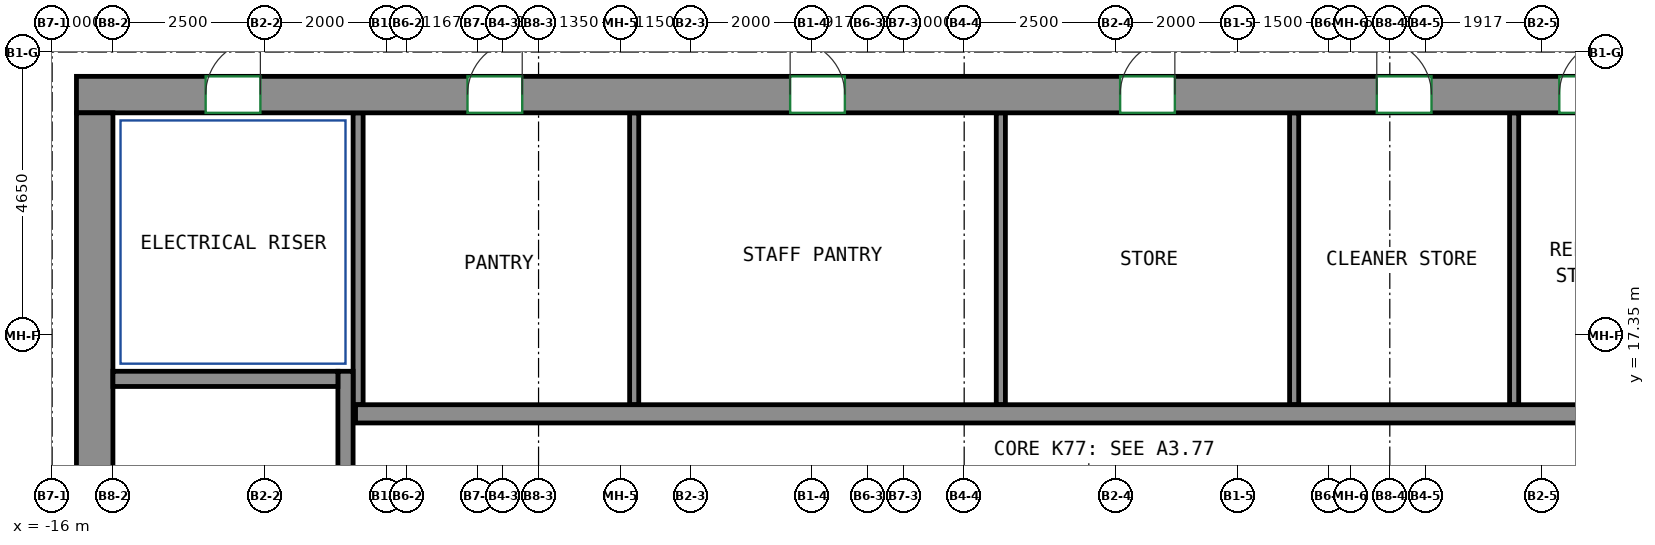
"""IFC4 building model, lengths in metres.
Left out: names, types, materials, properties, quantities, classifications, styles, units other than length and angle.
Written with IfcOpenShell. Run it as: python <this file> out.ifc"""

import sys

from ifc_helpers import new_model, si_unit, direction, frame, frame_2d, origin, place, context, subcontext, project, spatial, rectangle, extrude, source, transform, mapped, element, fill, save


model = new_model("IFC4")
c1 = context("Model", 3, precision=1e-05, world=origin(), true_north=direction((0.0, 1.0)))
c2 = subcontext(c1, "Body", "Model", "MODEL_VIEW")
j1 = project(units=[si_unit("LENGTHUNIT", "METRE"), si_unit("PLANEANGLEUNIT", "RADIAN")], contexts=[c1])
p1 = place(None, origin())
s1 = spatial("IfcSite", under=j1, at=p1, CompositionType="ELEMENT")
p2 = place(p1, origin())
s2 = spatial("IfcBuilding", under=s1, at=p2, CompositionType="ELEMENT")
p3 = place(p2, frame((0.0, 0.0, 305.2)))
s3 = spatial("IfcBuildingStorey", under=s2, at=p3, CompositionType="ELEMENT", Elevation=305.2)
m1 = source(origin(), c2, "Body", "SweptSolid", [
    extrude(rectangle(XDim=33.3, YDim=0.6, at=frame_2d((16.65, 0.0))), origin(), (0.0, 0.0, 1.0), 3.12),
])
p4 = place(p3, frame((-15.6, 21.3, 0.0), z_axis=(0.0, 0.0, 1.0), x_axis=(1.0, 0.0, 0.0)))
e1 = element("IfcWall", 1, at=p4, inside=s3, PredefinedType="SHEAR", context=c2, shape_type="MappedRepresentation", body=[
    mapped(m1, transform((0.0, 0.0, 0.0))),
])
p5 = place(p4, frame((6.431, 0.0, 0.0)))
e2 = element("IfcOpeningElement", 2, at=p5, cuts=e1, PredefinedType="OPENING", context=c2, shape_type="SweptSolid", body=[
    extrude(rectangle(XDim=0.9, YDim=2.1, at=frame_2d((0.45, 1.05))), frame((0.0, 0.31, 0.0), z_axis=(0.0, -1.0, 0.0), x_axis=(1.0, 0.0, 0.0)), (0.0, 0.0, 1.0), 0.62),
])
p6 = place(p4, frame((11.738, 0.0, 0.0)))
e3 = element("IfcOpeningElement", 3, at=p6, cuts=e1, PredefinedType="OPENING", context=c2, shape_type="SweptSolid", body=[
    extrude(rectangle(XDim=0.9, YDim=2.1, at=frame_2d((0.45, 1.05))), frame((0.0, 0.31, 0.0), z_axis=(0.0, -1.0, 0.0), x_axis=(1.0, 0.0, 0.0)), (0.0, 0.0, 1.0), 0.62),
])
p7 = place(p4, frame((17.165, 0.0, 0.0)))
e4 = element("IfcOpeningElement", 4, at=p7, cuts=e1, PredefinedType="OPENING", context=c2, shape_type="SweptSolid", body=[
    extrude(rectangle(XDim=0.9, YDim=2.1, at=frame_2d((0.45, 1.05))), frame((0.0, 0.31, 0.0), z_axis=(0.0, -1.0, 0.0), x_axis=(1.0, 0.0, 0.0)), (0.0, 0.0, 1.0), 0.62),
])
p8 = place(p4, frame((21.386, 0.0, 0.0)))
e5 = element("IfcOpeningElement", 5, at=p8, cuts=e1, PredefinedType="OPENING", context=c2, shape_type="SweptSolid", body=[
    extrude(rectangle(XDim=0.9, YDim=2.1, at=frame_2d((0.45, 1.05))), frame((0.0, 0.31, 0.0), z_axis=(0.0, -1.0, 0.0), x_axis=(1.0, 0.0, 0.0)), (0.0, 0.0, 1.0), 0.62),
])
p9 = place(p4, frame((24.387, 0.0, 0.0)))
e6 = element("IfcOpeningElement", 6, at=p9, cuts=e1, PredefinedType="OPENING", context=c2, shape_type="SweptSolid", body=[
    extrude(rectangle(XDim=0.9, YDim=2.1, at=frame_2d((0.45, 1.05))), frame((0.0, 0.31, 0.0), z_axis=(0.0, -1.0, 0.0), x_axis=(1.0, 0.0, 0.0)), (0.0, 0.0, 1.0), 0.62),
])
p10 = place(p4, frame((26.92, 0.0, 0.0)))
e7 = element("IfcOpeningElement", 7, at=p10, cuts=e1, PredefinedType="OPENING", context=c2, shape_type="SweptSolid", body=[
    extrude(rectangle(XDim=0.9, YDim=2.1, at=frame_2d((0.45, 1.05))), frame((0.0, 0.31, 0.0), z_axis=(0.0, -1.0, 0.0), x_axis=(1.0, 0.0, 0.0)), (0.0, 0.0, 1.0), 0.62),
])
p11 = place(p4, frame((2.125, 0.0, 0.0)))
e8 = element("IfcOpeningElement", 8, at=p11, cuts=e1, PredefinedType="OPENING", context=c2, shape_type="SweptSolid", body=[
    extrude(rectangle(XDim=0.9, YDim=2.1, at=frame_2d((0.45, 1.05))), frame((0.0, 0.31, 0.0), z_axis=(0.0, -1.0, 0.0), x_axis=(1.0, 0.0, 0.0)), (0.0, 0.0, 1.0), 0.62),
])
p12 = place(p4, frame((30.275, 0.0, 0.0)))
e9 = element("IfcOpeningElement", 9, at=p12, cuts=e1, PredefinedType="OPENING", context=c2, shape_type="SweptSolid", body=[
    extrude(rectangle(XDim=0.9, YDim=2.1, at=frame_2d((0.45, 1.05))), frame((0.0, 0.31, 0.0), z_axis=(0.0, -1.0, 0.0), x_axis=(1.0, 0.0, 0.0)), (0.0, 0.0, 1.0), 0.62),
])
m2 = source(origin(), c2, "Body", "SweptSolid", [
    extrude(rectangle(XDim=12.0, YDim=0.6, at=frame_2d((6.0, 0.0))), origin(), (0.0, 0.0, 1.0), 3.12),
])
p13 = place(p3, frame((-15.3, 9.0, 0.0), z_axis=(0.0, 0.0, 1.0), x_axis=(0.0, 1.0, 0.0)))
e10 = element("IfcWall", 10, at=p13, inside=s3, PredefinedType="SHEAR", context=c2, shape_type="MappedRepresentation", body=[
    mapped(m2, transform((0.0, 0.0, 0.0))),
])
m3 = source(origin(), c2, "Body", "SweptSolid", [
    extrude(rectangle(XDim=7.75, YDim=0.25, at=frame_2d((3.875, 0.0))), origin(), (0.0, 0.0, 1.0), 3.12),
])
p14 = place(p3, frame((-11.175, 9.0, 0.0), z_axis=(0.0, 0.0, 1.0), x_axis=(0.0, 1.0, 0.0)))
e11 = element("IfcWall", 11, at=p14, inside=s3, PredefinedType="SHEAR", context=c2, shape_type="MappedRepresentation", body=[
    mapped(m3, transform((0.0, 0.0, 0.0))),
])
m4 = source(origin(), c2, "Body", "SweptSolid", [
    extrude(rectangle(XDim=3.7, YDim=0.25, at=frame_2d((1.85, 0.0))), origin(), (0.0, 0.0, 1.0), 3.12),
])
p15 = place(p3, frame((-15.0, 16.625, 0.0), z_axis=(0.0, 0.0, 1.0), x_axis=(1.0, 0.0, 0.0)))
e12 = element("IfcWall", 12, at=p15, inside=s3, PredefinedType="SHEAR", context=c2, shape_type="MappedRepresentation", body=[
    mapped(m4, transform((0.0, 0.0, 0.0))),
])
m5 = source(origin(), c2, "Body", "SweptSolid", [
    extrude(rectangle(XDim=22.08, YDim=0.3, at=frame_2d((11.04, 0.0))), origin(), (0.0, 0.0, 1.0), 3.12),
])
p16 = place(p3, frame((-11.01, 16.05, 0.0), z_axis=(0.0, 0.0, 1.0), x_axis=(1.0, 0.0, 0.0)))
e13 = element("IfcWall", 13, at=p16, inside=s3, PredefinedType="SHEAR", context=c2, shape_type="MappedRepresentation", body=[
    mapped(m5, transform((0.0, 0.0, 0.0))),
])
m6 = source(origin(), c2, "Body", "SweptSolid", [
    extrude(rectangle(XDim=4.8, YDim=0.165, at=frame_2d((2.4, 0.0))), origin(), (0.0, 0.0, 1.0), 3.12),
])
p17 = place(p3, frame((-10.968, 16.2, 0.0), z_axis=(0.0, 0.0, 1.0), x_axis=(0.0, 1.0, 0.0)))
e14 = element("IfcWall", 14, at=p17, inside=s3, PredefinedType="PARTITIONING", context=c2, shape_type="MappedRepresentation", body=[
    mapped(m6, transform((0.0, 0.0, 0.0))),
])
m7 = source(origin(), c2, "Body", "SweptSolid", [
    extrude(rectangle(XDim=4.8, YDim=0.15, at=frame_2d((2.4, 0.0))), origin(), (0.0, 0.0, 1.0), 3.12),
])
for number, where, z_axis, x_axis in (
    (15, (-6.427, 16.2, 0.0), (0.0, 0.0, 1.0), (0.0, 1.0, 0.0)),
    (16, (-0.397, 16.2, 0.0), (0.0, 0.0, 1.0), (0.0, 1.0, 0.0)),
    (17, (4.427, 16.2, 0.0), (0.0, 0.0, 1.0), (0.0, 1.0, 0.0)),
    (18, (8.045, 16.2, 0.0), (0.0, 0.0, 1.0), (0.0, 1.0, 0.0)),
):
    element("IfcWall", number, at=place(p3, frame(where, z_axis=z_axis, x_axis=x_axis)), inside=s3, PredefinedType="PARTITIONING", context=c2, shape_type="MappedRepresentation", body=[
        mapped(m7, transform((0.0, 0.0, 0.0))),
    ])
p18 = place(p5, origin())
e19 = element("IfcDoor", 19, at=p18, inside=s3, OperationType="SINGLE_SWING_RIGHT", PredefinedType="DOOR", context=c2, shape_type="SweptSolid", body=[
    extrude(rectangle(XDim=0.9, YDim=2.1, at=frame_2d((0.45, 1.05))), frame((0.0, -0.155, 0.0), z_axis=(0.0, -1.0, 0.0), x_axis=(1.0, 0.0, 0.0)), (0.0, 0.0, 1.0), 0.05),
])
fill(e2, e19)
p19 = place(p6, origin())
e20 = element("IfcDoor", 20, at=p19, inside=s3, OperationType="SINGLE_SWING_LEFT", PredefinedType="DOOR", context=c2, shape_type="SweptSolid", body=[
    extrude(rectangle(XDim=0.9, YDim=2.1, at=frame_2d((0.45, 1.05))), frame((0.0, -0.155, 0.0), z_axis=(0.0, -1.0, 0.0), x_axis=(1.0, 0.0, 0.0)), (0.0, 0.0, 1.0), 0.05),
])
fill(e3, e20)
p20 = place(p7, origin())
e21 = element("IfcDoor", 21, at=p20, inside=s3, OperationType="SINGLE_SWING_RIGHT", PredefinedType="DOOR", context=c2, shape_type="SweptSolid", body=[
    extrude(rectangle(XDim=0.9, YDim=2.1, at=frame_2d((0.45, 1.05))), frame((0.0, -0.155, 0.0), z_axis=(0.0, -1.0, 0.0), x_axis=(1.0, 0.0, 0.0)), (0.0, 0.0, 1.0), 0.05),
])
fill(e4, e21)
p21 = place(p8, origin())
e22 = element("IfcDoor", 22, at=p21, inside=s3, OperationType="SINGLE_SWING_LEFT", PredefinedType="DOOR", context=c2, shape_type="SweptSolid", body=[
    extrude(rectangle(XDim=0.9, YDim=2.1, at=frame_2d((0.45, 1.05))), frame((0.0, -0.155, 0.0), z_axis=(0.0, -1.0, 0.0), x_axis=(1.0, 0.0, 0.0)), (0.0, 0.0, 1.0), 0.05),
])
fill(e5, e22)
p22 = place(p9, origin())
e23 = element("IfcDoor", 23, at=p22, inside=s3, OperationType="SINGLE_SWING_RIGHT", PredefinedType="DOOR", context=c2, shape_type="SweptSolid", body=[
    extrude(rectangle(XDim=0.9, YDim=2.1, at=frame_2d((0.45, 1.05))), frame((0.0, -0.155, 0.0), z_axis=(0.0, -1.0, 0.0), x_axis=(1.0, 0.0, 0.0)), (0.0, 0.0, 1.0), 0.05),
])
fill(e6, e23)
p23 = place(p11, origin())
e24 = element("IfcDoor", 24, at=p23, inside=s3, OperationType="SINGLE_SWING_RIGHT", PredefinedType="DOOR", context=c2, shape_type="SweptSolid", body=[
    extrude(rectangle(XDim=0.9, YDim=2.1, at=frame_2d((0.45, 1.05))), frame((0.0, -0.155, 0.0), z_axis=(0.0, -1.0, 0.0), x_axis=(1.0, 0.0, 0.0)), (0.0, 0.0, 1.0), 0.05),
])
fill(e8, e24)
save(model, sys.argv[1])
